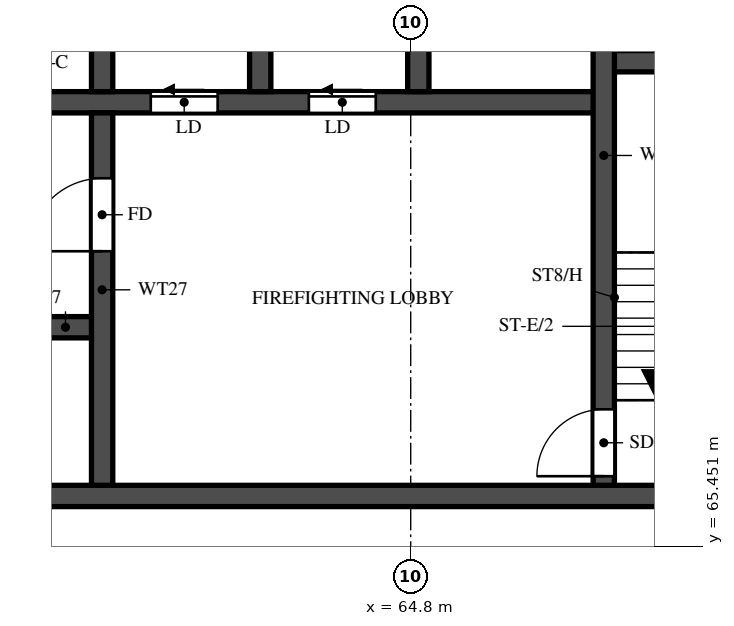
"""IFC4 building model, lengths in metres.
Left out: names, types, materials, properties, quantities, classifications, styles, units other than length and angle.
Written with IfcOpenShell. Run it as: python <this file> out.ifc"""

import sys

from ifc_helpers import new_model, si_unit, direction, frame, frame_2d, origin, place, context, subcontext, project, spatial, rectangle, extrude, element, fill, save


model = new_model("IFC4")
c1 = context("Model", 3, precision=1e-05, world=origin(), true_north=direction((0.0, 1.0)))
c2 = subcontext(c1, "Body", "Model", "MODEL_VIEW")
j1 = project(units=[si_unit("LENGTHUNIT", "METRE"), si_unit("PLANEANGLEUNIT", "RADIAN")], contexts=[c1])
p1 = place(None, origin())
s1 = spatial("IfcSite", under=j1, at=p1, CompositionType="ELEMENT")
p2 = place(p1, origin())
s2 = spatial("IfcBuilding", under=s1, at=p2, CompositionType="ELEMENT")
p3 = place(p2, frame((0.0, 0.0, 199.0)))
s3 = spatial("IfcBuildingStorey", under=s2, at=p3, CompositionType="ELEMENT", Elevation=199.0)
p4 = place(p3, frame((29.7, 66.275, 0.0), z_axis=(0.0, 0.0, 1.0), x_axis=(1.0, 0.0, 0.0)))
e1 = element("IfcWall", 1, at=p4, inside=s3, PredefinedType="SHEAR", context=c2, shape_type="SweptSolid", body=[
    extrude(rectangle(XDim=41.4, YDim=0.35, at=frame_2d((20.7, 0.0))), origin(), (0.0, 0.0, 1.0), 3.2),
])
p5 = place(p4, frame((0.925, 0.0, 0.0)))
e2 = element("IfcOpeningElement", 2, at=p5, cuts=e1, PredefinedType="OPENING", context=c2, shape_type="SweptSolid", body=[
    extrude(rectangle(XDim=1.1, YDim=2.1, at=frame_2d((0.55, 1.05))), frame((0.0, 0.185, 0.0), z_axis=(0.0, -1.0, 0.0), x_axis=(1.0, 0.0, 0.0)), (0.0, 0.0, 1.0), 0.37),
])
p6 = place(p4, frame((3.712, 0.0, 0.0)))
e3 = element("IfcOpeningElement", 3, at=p6, cuts=e1, PredefinedType="OPENING", context=c2, shape_type="SweptSolid", body=[
    extrude(rectangle(XDim=1.8, YDim=2.1, at=frame_2d((0.9, 1.05))), frame((0.0, 0.185, 0.0), z_axis=(0.0, -1.0, 0.0), x_axis=(1.0, 0.0, 0.0)), (0.0, 0.0, 1.0), 0.37),
])
p7 = place(p3, frame((35.625, 69.05, 0.0), z_axis=(0.0, 0.0, 1.0), x_axis=(1.0, 0.0, 0.0)))
e4 = element("IfcWall", 4, at=p7, inside=s3, PredefinedType="SHEAR", context=c2, shape_type="SweptSolid", body=[
    extrude(rectangle(XDim=24.1, YDim=0.35, at=frame_2d((12.05, 0.0))), origin(), (0.0, 0.0, 1.0), 3.2),
])
p8 = place(p7, frame((1.0, 0.0, 0.0)))
e5 = element("IfcOpeningElement", 5, at=p8, cuts=e4, PredefinedType="OPENING", context=c2, shape_type="SweptSolid", body=[
    extrude(rectangle(XDim=1.1, YDim=2.1, at=frame_2d((0.55, 1.05))), frame((0.0, 0.185, 0.0), z_axis=(0.0, -1.0, 0.0), x_axis=(1.0, 0.0, 0.0)), (0.0, 0.0, 1.0), 0.37),
])
p9 = place(p7, frame((3.75, 0.0, 0.0)))
e6 = element("IfcOpeningElement", 6, at=p9, cuts=e4, PredefinedType="OPENING", context=c2, shape_type="SweptSolid", body=[
    extrude(rectangle(XDim=1.1, YDim=2.1, at=frame_2d((0.55, 1.05))), frame((0.0, 0.185, 0.0), z_axis=(0.0, -1.0, 0.0), x_axis=(1.0, 0.0, 0.0)), (0.0, 0.0, 1.0), 0.37),
])
p10 = place(p7, frame((6.5, 0.0, 0.0)))
e7 = element("IfcOpeningElement", 7, at=p10, cuts=e4, PredefinedType="OPENING", context=c2, shape_type="SweptSolid", body=[
    extrude(rectangle(XDim=1.1, YDim=2.1, at=frame_2d((0.55, 1.05))), frame((0.0, 0.185, 0.0), z_axis=(0.0, -1.0, 0.0), x_axis=(1.0, 0.0, 0.0)), (0.0, 0.0, 1.0), 0.37),
])
p11 = place(p7, frame((9.25, 0.0, 0.0)))
e8 = element("IfcOpeningElement", 8, at=p11, cuts=e4, PredefinedType="OPENING", context=c2, shape_type="SweptSolid", body=[
    extrude(rectangle(XDim=1.1, YDim=2.1, at=frame_2d((0.55, 1.05))), frame((0.0, 0.185, 0.0), z_axis=(0.0, -1.0, 0.0), x_axis=(1.0, 0.0, 0.0)), (0.0, 0.0, 1.0), 0.37),
])
p12 = place(p7, frame((12.0, 0.0, 0.0)))
e9 = element("IfcOpeningElement", 9, at=p12, cuts=e4, PredefinedType="OPENING", context=c2, shape_type="SweptSolid", body=[
    extrude(rectangle(XDim=1.1, YDim=2.1, at=frame_2d((0.55, 1.05))), frame((0.0, 0.185, 0.0), z_axis=(0.0, -1.0, 0.0), x_axis=(1.0, 0.0, 0.0)), (0.0, 0.0, 1.0), 0.37),
])
p13 = place(p7, frame((14.75, 0.0, 0.0)))
e10 = element("IfcOpeningElement", 10, at=p13, cuts=e4, PredefinedType="OPENING", context=c2, shape_type="SweptSolid", body=[
    extrude(rectangle(XDim=1.1, YDim=2.1, at=frame_2d((0.55, 1.05))), frame((0.0, 0.185, 0.0), z_axis=(0.0, -1.0, 0.0), x_axis=(1.0, 0.0, 0.0)), (0.0, 0.0, 1.0), 0.37),
])
p14 = place(p7, frame((17.625, 0.0, 0.0)))
e11 = element("IfcOpeningElement", 11, at=p14, cuts=e4, PredefinedType="OPENING", context=c2, shape_type="SweptSolid", body=[
    extrude(rectangle(XDim=1.1, YDim=2.1, at=frame_2d((0.55, 1.05))), frame((0.0, 0.185, 0.0), z_axis=(0.0, -1.0, 0.0), x_axis=(1.0, 0.0, 0.0)), (0.0, 0.0, 1.0), 0.37),
])
p15 = place(p7, frame((20.625, 0.0, 0.0)))
e12 = element("IfcOpeningElement", 12, at=p15, cuts=e4, PredefinedType="OPENING", context=c2, shape_type="SweptSolid", body=[
    extrude(rectangle(XDim=1.1, YDim=2.1, at=frame_2d((0.55, 1.05))), frame((0.0, 0.185, 0.0), z_axis=(0.0, -1.0, 0.0), x_axis=(1.0, 0.0, 0.0)), (0.0, 0.0, 1.0), 0.37),
])
p16 = place(p3, frame((32.825, 72.75, 0.0), z_axis=(0.0, 0.0, 1.0), x_axis=(1.0, 0.0, 0.0)))
e13 = element("IfcWall", 13, at=p16, inside=s3, PredefinedType="SHEAR", context=c2, shape_type="SweptSolid", body=[
    extrude(rectangle(XDim=35.15, YDim=0.35, at=frame_2d((17.575, 0.0))), origin(), (0.0, 0.0, 1.0), 3.2),
])
p17 = place(p16, frame((19.8, 0.0, 0.0)))
e14 = element("IfcOpeningElement", 14, at=p17, cuts=e13, PredefinedType="OPENING", context=c2, shape_type="SweptSolid", body=[
    extrude(rectangle(XDim=1.1, YDim=2.1, at=frame_2d((0.55, 1.05))), frame((0.0, 0.185, 0.0), z_axis=(0.0, -1.0, 0.0), x_axis=(1.0, 0.0, 0.0)), (0.0, 0.0, 1.0), 0.37),
])
p18 = place(p16, frame((27.7, 0.0, 0.0)))
e15 = element("IfcOpeningElement", 15, at=p18, cuts=e13, PredefinedType="OPENING", context=c2, shape_type="SweptSolid", body=[
    extrude(rectangle(XDim=1.1, YDim=2.1, at=frame_2d((0.55, 1.05))), frame((0.0, 0.185, 0.0), z_axis=(0.0, -1.0, 0.0), x_axis=(1.0, 0.0, 0.0)), (0.0, 0.0, 1.0), 0.37),
])
p19 = place(p16, frame((30.3, 0.0, 0.0)))
e16 = element("IfcOpeningElement", 16, at=p19, cuts=e13, PredefinedType="OPENING", context=c2, shape_type="SweptSolid", body=[
    extrude(rectangle(XDim=1.1, YDim=2.1, at=frame_2d((0.55, 1.05))), frame((0.0, 0.185, 0.0), z_axis=(0.0, -1.0, 0.0), x_axis=(1.0, 0.0, 0.0)), (0.0, 0.0, 1.0), 0.37),
])
p20 = place(p16, frame((3.8, 0.0, 0.0)))
e17 = element("IfcOpeningElement", 17, at=p20, cuts=e13, PredefinedType="OPENING", context=c2, shape_type="SweptSolid", body=[
    extrude(rectangle(XDim=1.1, YDim=2.1, at=frame_2d((0.55, 1.05))), frame((0.0, 0.185, 0.0), z_axis=(0.0, -1.0, 0.0), x_axis=(1.0, 0.0, 0.0)), (0.0, 0.0, 1.0), 0.37),
])
p21 = place(p16, frame((6.55, 0.0, 0.0)))
e18 = element("IfcOpeningElement", 18, at=p21, cuts=e13, PredefinedType="OPENING", context=c2, shape_type="SweptSolid", body=[
    extrude(rectangle(XDim=1.1, YDim=2.1, at=frame_2d((0.55, 1.05))), frame((0.0, 0.185, 0.0), z_axis=(0.0, -1.0, 0.0), x_axis=(1.0, 0.0, 0.0)), (0.0, 0.0, 1.0), 0.37),
])
p22 = place(p16, frame((9.3, 0.0, 0.0)))
e19 = element("IfcOpeningElement", 19, at=p22, cuts=e13, PredefinedType="OPENING", context=c2, shape_type="SweptSolid", body=[
    extrude(rectangle(XDim=1.1, YDim=2.1, at=frame_2d((0.55, 1.05))), frame((0.0, 0.185, 0.0), z_axis=(0.0, -1.0, 0.0), x_axis=(1.0, 0.0, 0.0)), (0.0, 0.0, 1.0), 0.37),
])
p23 = place(p16, frame((12.05, 0.0, 0.0)))
e20 = element("IfcOpeningElement", 20, at=p23, cuts=e13, PredefinedType="OPENING", context=c2, shape_type="SweptSolid", body=[
    extrude(rectangle(XDim=1.1, YDim=2.1, at=frame_2d((0.55, 1.05))), frame((0.0, 0.185, 0.0), z_axis=(0.0, -1.0, 0.0), x_axis=(1.0, 0.0, 0.0)), (0.0, 0.0, 1.0), 0.37),
])
p24 = place(p16, frame((14.8, 0.0, 0.0)))
e21 = element("IfcOpeningElement", 21, at=p24, cuts=e13, PredefinedType="OPENING", context=c2, shape_type="SweptSolid", body=[
    extrude(rectangle(XDim=1.1, YDim=2.1, at=frame_2d((0.55, 1.05))), frame((0.0, 0.185, 0.0), z_axis=(0.0, -1.0, 0.0), x_axis=(1.0, 0.0, 0.0)), (0.0, 0.0, 1.0), 0.37),
])
p25 = place(p16, frame((17.55, 0.0, 0.0)))
e22 = element("IfcOpeningElement", 22, at=p25, cuts=e13, PredefinedType="OPENING", context=c2, shape_type="SweptSolid", body=[
    extrude(rectangle(XDim=1.1, YDim=2.1, at=frame_2d((0.55, 1.05))), frame((0.0, 0.185, 0.0), z_axis=(0.0, -1.0, 0.0), x_axis=(1.0, 0.0, 0.0)), (0.0, 0.0, 1.0), 0.37),
])
p26 = place(p16, frame((0.938, 0.0, 0.0)))
e23 = element("IfcOpeningElement", 23, at=p26, cuts=e13, PredefinedType="OPENING", context=c2, shape_type="SweptSolid", body=[
    extrude(rectangle(XDim=1.1, YDim=2.1, at=frame_2d((0.55, 1.05))), frame((0.0, 0.185, 0.0), z_axis=(0.0, -1.0, 0.0), x_axis=(1.0, 0.0, 0.0)), (0.0, 0.0, 1.0), 0.37),
])
p27 = place(p3, frame((67.975, 73.425, 0.0), z_axis=(0.0, 0.0, 1.0), x_axis=(1.0, 0.0, 0.0)))
e24 = element("IfcWall", 24, at=p27, inside=s3, PredefinedType="SHEAR", context=c2, shape_type="SweptSolid", body=[
    extrude(rectangle(XDim=3.125, YDim=0.35, at=frame_2d((1.562, 0.0))), origin(), (0.0, 0.0, 1.0), 3.2),
])
p28 = place(p3, frame((67.975, 66.45, 0.0), z_axis=(0.0, 0.0, 1.0), x_axis=(0.0, 1.0, 0.0)))
e25 = element("IfcWall", 25, at=p28, inside=s3, PredefinedType="SHEAR", context=c2, shape_type="SweptSolid", body=[
    extrude(rectangle(XDim=10.85, YDim=0.35, at=frame_2d((5.425, 0.0))), origin(), (0.0, 0.0, 1.0), 3.2),
])
p29 = place(p28, frame((0.15, 0.0, 0.0)))
e26 = element("IfcOpeningElement", 26, at=p29, cuts=e25, PredefinedType="OPENING", context=c2, shape_type="SweptSolid", body=[
    extrude(rectangle(XDim=1.1, YDim=2.1, at=frame_2d((0.55, 1.05))), frame((0.0, 0.185, 0.0), z_axis=(0.0, -1.0, 0.0), x_axis=(1.0, 0.0, 0.0)), (0.0, 0.0, 1.0), 0.37),
])
p30 = place(p3, frame((59.725, 66.45, 0.0), z_axis=(0.0, 0.0, 1.0), x_axis=(0.0, 1.0, 0.0)))
e27 = element("IfcWall", 27, at=p30, inside=s3, PredefinedType="SHEAR", context=c2, shape_type="SweptSolid", body=[
    extrude(rectangle(XDim=6.125, YDim=0.35, at=frame_2d((3.062, 0.0))), origin(), (0.0, 0.0, 1.0), 3.2),
])
p31 = place(p30, frame((3.85, 0.0, 0.0)))
e28 = element("IfcOpeningElement", 28, at=p31, cuts=e27, PredefinedType="OPENING", context=c2, shape_type="SweptSolid", body=[
    extrude(rectangle(XDim=1.2, YDim=2.1, at=frame_2d((0.6, 1.05))), frame((0.0, 0.185, 0.0), z_axis=(0.0, -1.0, 0.0), x_axis=(1.0, 0.0, 0.0)), (0.0, 0.0, 1.0), 0.37),
])
for number, where, z_axis, x_axis in (
    (29, (59.725, 72.925, 0.0), (0.0, 0.0, 1.0), (0.0, 1.0, 0.0)),
    (30, (62.325, 72.925, 0.0), (0.0, 0.0, 1.0), (0.0, 1.0, 0.0)),
    (31, (64.925, 72.925, 0.0), (0.0, 0.0, 1.0), (0.0, 1.0, 0.0)),
):
    element("IfcWall", number, at=place(p3, frame(where, z_axis=z_axis, x_axis=x_axis)), inside=s3, PredefinedType="SHEAR", context=c2, shape_type="SweptSolid", body=[
        extrude(rectangle(XDim=2.95, YDim=0.35, at=frame_2d((1.475, 0.0))), origin(), (0.0, 0.0, 1.0), 3.2),
    ])
p32 = place(p29, origin())
e32 = element("IfcDoor", 32, at=p32, inside=s3, OperationType="SINGLE_SWING_LEFT", PredefinedType="DOOR", context=c2, shape_type="SweptSolid", body=[
    extrude(rectangle(XDim=1.1, YDim=2.1, at=frame_2d((0.55, 1.05))), frame((0.0, 0.025, 0.0), z_axis=(0.0, -1.0, 0.0), x_axis=(1.0, 0.0, 0.0)), (0.0, 0.0, 1.0), 0.05),
])
fill(e26, e32)
p33 = place(p31, origin())
e33 = element("IfcDoor", 33, at=p33, inside=s3, OperationType="SINGLE_SWING_LEFT", PredefinedType="DOOR", context=c2, shape_type="SweptSolid", body=[
    extrude(rectangle(XDim=1.2, YDim=2.1, at=frame_2d((0.6, 1.05))), frame((0.0, 0.025, 0.0), z_axis=(0.0, -1.0, 0.0), x_axis=(1.0, 0.0, 0.0)), (0.0, 0.0, 1.0), 0.05),
])
fill(e28, e33)
p34 = place(p18, origin())
e34 = element("IfcDoor", 34, at=p34, inside=s3, OperationType="SLIDING_TO_LEFT", PredefinedType="DOOR", context=c2, shape_type="SweptSolid", body=[
    extrude(rectangle(XDim=1.1, YDim=2.1, at=frame_2d((0.55, 1.05))), frame((0.0, 0.025, 0.0), z_axis=(0.0, -1.0, 0.0), x_axis=(1.0, 0.0, 0.0)), (0.0, 0.0, 1.0), 0.05),
])
fill(e15, e34)
p35 = place(p19, origin())
e35 = element("IfcDoor", 35, at=p35, inside=s3, OperationType="SLIDING_TO_LEFT", PredefinedType="DOOR", context=c2, shape_type="SweptSolid", body=[
    extrude(rectangle(XDim=1.1, YDim=2.1, at=frame_2d((0.55, 1.05))), frame((0.0, 0.025, 0.0), z_axis=(0.0, -1.0, 0.0), x_axis=(1.0, 0.0, 0.0)), (0.0, 0.0, 1.0), 0.05),
])
fill(e16, e35)
save(model, sys.argv[1])
